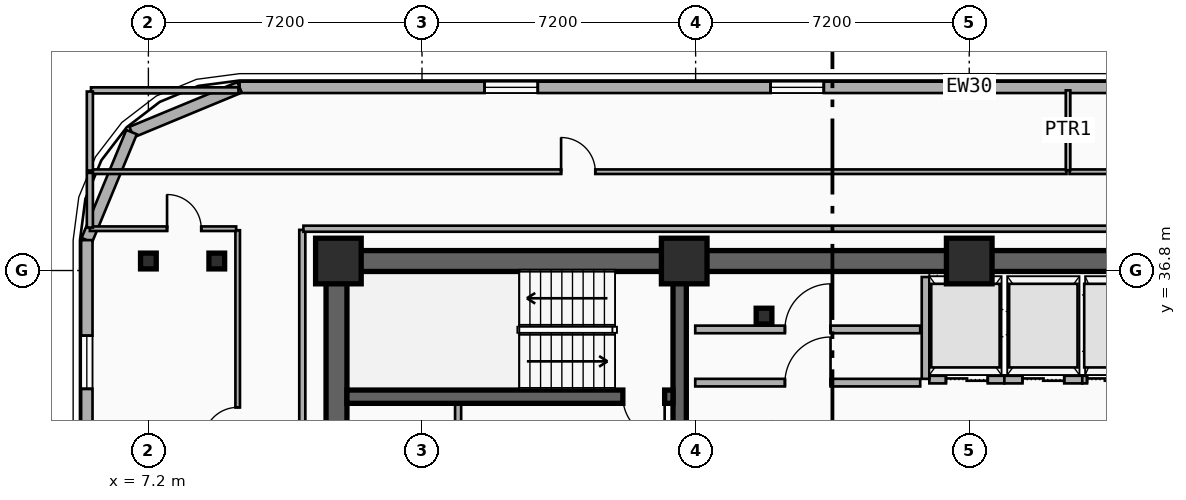
"""IFC4 building model, lengths in metres.
Left out: names, types, materials, properties, quantities, classifications, styles, units other than length and angle.
Written with IfcOpenShell. Run it as: python <this file> out.ifc"""

import sys

from ifc_helpers import new_model, si_unit, direction, frame, frame_2d, origin, origin_2d, place, context, subcontext, project, spatial, rectangle, i_section, extrude, element, fill, save


model = new_model("IFC4")
c1 = context("Model", 3, precision=1e-05, world=origin(), true_north=direction((0.0, 1.0)))
c2 = subcontext(c1, "Body", "Model", "MODEL_VIEW")
j1 = project(units=[si_unit("LENGTHUNIT", "METRE"), si_unit("PLANEANGLEUNIT", "RADIAN")], contexts=[c1])
p1 = place(None, origin())
s1 = spatial("IfcSite", under=j1, at=p1, CompositionType="ELEMENT")
p2 = place(p1, origin())
s2 = spatial("IfcBuilding", under=s1, at=p2, CompositionType="ELEMENT")
p3 = place(p2, frame((0.0, 0.0, 141.25)))
s3 = spatial("IfcBuildingStorey", under=s2, at=p3, CompositionType="ELEMENT", Elevation=141.25)
p4 = place(p3, frame((12.15, 37.05, 0.0), z_axis=(0.0, 0.0, 1.0), x_axis=(1.0, 0.0, 0.0)))
e1 = element("IfcWall", 1, at=p4, inside=s3, PredefinedType="SHEAR", context=c2, shape_type="SweptSolid", body=[
    extrude(rectangle(XDim=33.23, YDim=0.55, at=frame_2d((16.615, 0.0))), origin(), (0.0, 0.0, 1.0), 3.55),
])
p5 = place(p3, frame((12.15, 28.095, 0.0), z_axis=(0.0, 0.0, 1.0), x_axis=(0.0, 1.0, 0.0)))
e2 = element("IfcWall", 2, at=p5, inside=s3, PredefinedType="SHEAR", context=c2, shape_type="SweptSolid", body=[
    extrude(rectangle(XDim=8.68, YDim=0.55, at=frame_2d((4.34, 0.0))), origin(), (0.0, 0.0, 1.0), 3.55),
])
p6 = place(p3, frame((21.18, 28.095, 0.0), z_axis=(0.0, 0.0, 1.0), x_axis=(0.0, 1.0, 0.0)))
e3 = element("IfcWall", 3, at=p6, inside=s3, PredefinedType="SHEAR", context=c2, shape_type="SweptSolid", body=[
    extrude(rectangle(XDim=8.68, YDim=0.35, at=frame_2d((4.34, 0.0))), origin(), (0.0, 0.0, 1.0), 3.55),
])
p7 = place(p3, frame((21.005, 33.48, 0.0), z_axis=(0.0, 0.0, 1.0), x_axis=(-1.0, 0.0, 0.0)))
e4 = element("IfcWall", 4, at=p7, inside=s3, PredefinedType="SHEAR", context=c2, shape_type="SweptSolid", body=[
    extrude(rectangle(XDim=8.58, YDim=0.35, at=frame_2d((4.29, 0.0))), origin(), (0.0, 0.0, 1.0), 3.55),
])
p8 = place(p7, frame((0.22, 0.0, 0.0)))
e5 = element("IfcOpeningElement", 5, at=p8, cuts=e4, PredefinedType="OPENING", context=c2, shape_type="SweptSolid", body=[
    extrude(rectangle(XDim=1.1, YDim=2.15, at=frame_2d((0.55, 1.075))), frame((0.0, 0.185, 0.0), z_axis=(0.0, -1.0, 0.0), x_axis=(1.0, 0.0, 0.0)), (0.0, 0.0, 1.0), 0.37),
])
p9 = place(p3, frame((23.4, 35.6, 0.0), z_axis=(0.0, 0.0, 1.0), x_axis=(1.0, 0.0, 0.0)))
e6 = element("IfcColumn", 6, at=p9, inside=s3, PredefinedType="COLUMN", context=c2, shape_type="SweptSolid", body=[
    extrude(i_section(OverallWidth=0.413, OverallDepth=0.415, WebThickness=0.03, FlangeThickness=0.047, FilletRadius=0.015, at=origin_2d()), origin(), (0.0, 0.0, 1.0), 3.55),
])
for number, where, z_axis, x_axis in (
    (7, (12.2, 37.05, 0.0), (0.0, 0.0, 1.0), (1.0, 0.0, 0.0)),
    (8, (21.3, 37.05, 0.0), (0.0, 0.0, 1.0), (1.0, 0.0, 0.0)),
    (9, (28.8, 37.05, 0.0), (0.0, 0.0, 1.0), (1.0, 0.0, 0.0)),
):
    element("IfcColumn", number, at=place(p3, frame(where, z_axis=z_axis, x_axis=x_axis)), inside=s3, PredefinedType="COLUMN", context=c2, shape_type="SweptSolid", body=[
        extrude(rectangle(XDim=1.2, YDim=1.2, at=origin_2d()), origin(), (0.0, 0.0, 1.0), 3.55),
    ])
for number, where, z_axis, x_axis in (
    (10, (9.0, 37.05, 0.0), (0.0, 0.0, 1.0), (1.0, 0.0, 0.0)),
    (11, (7.2, 37.05, 0.0), (0.0, 0.0, 1.0), (1.0, 0.0, 0.0)),
):
    element("IfcColumn", number, at=place(p3, frame(where, z_axis=z_axis, x_axis=x_axis)), inside=s3, PredefinedType="COLUMN", context=c2, shape_type="SweptSolid", body=[
        extrude(i_section(OverallWidth=0.413, OverallDepth=0.415, WebThickness=0.03, FlangeThickness=0.047, FilletRadius=0.015, at=origin_2d()), origin(), (0.0, 0.0, 1.0), 3.55),
    ])
p10 = place(p3, frame((9.6, 41.62, 0.0), z_axis=(0.0, 0.0, 1.0), x_axis=(1.0, 0.0, 0.0)))
e12 = element("IfcWall", 12, at=p10, inside=s3, PredefinedType="SOLIDWALL", context=c2, shape_type="SweptSolid", body=[
    extrude(rectangle(XDim=38.4, YDim=0.3, at=frame_2d((19.2, 0.0))), origin(), (0.0, 0.0, 1.0), 3.29),
])
p11 = place(p10, frame((6.447, 0.0, 0.75)))
e13 = element("IfcOpeningElement", 13, at=p11, cuts=e12, PredefinedType="OPENING", context=c2, shape_type="SweptSolid", body=[
    extrude(rectangle(XDim=1.4, YDim=2.1, at=frame_2d((0.7, 1.05))), frame((0.0, 0.16, 0.0), z_axis=(0.0, -1.0, 0.0), x_axis=(1.0, 0.0, 0.0)), (0.0, 0.0, 1.0), 0.32),
])
p12 = place(p10, frame((13.973, 0.0, 0.75)))
e14 = element("IfcOpeningElement", 14, at=p12, cuts=e12, PredefinedType="OPENING", context=c2, shape_type="SweptSolid", body=[
    extrude(rectangle(XDim=1.4, YDim=2.1, at=frame_2d((0.7, 1.05))), frame((0.0, 0.16, 0.0), z_axis=(0.0, -1.0, 0.0), x_axis=(1.0, 0.0, 0.0)), (0.0, 0.0, 1.0), 0.32),
])
p13 = place(p10, frame((26.493, 0.0, 0.75)))
e15 = element("IfcOpeningElement", 15, at=p13, cuts=e12, PredefinedType="OPENING", context=c2, shape_type="SweptSolid", body=[
    extrude(rectangle(XDim=1.4, YDim=2.1, at=frame_2d((0.7, 1.05))), frame((0.0, 0.16, 0.0), z_axis=(0.0, -1.0, 0.0), x_axis=(1.0, 0.0, 0.0)), (0.0, 0.0, 1.0), 0.32),
])
p14 = place(p10, frame((32.287, 0.0, 0.75)))
e16 = element("IfcOpeningElement", 16, at=p14, cuts=e12, PredefinedType="OPENING", context=c2, shape_type="SweptSolid", body=[
    extrude(rectangle(XDim=1.4, YDim=2.1, at=frame_2d((0.7, 1.05))), frame((0.0, 0.16, 0.0), z_axis=(0.0, -1.0, 0.0), x_axis=(1.0, 0.0, 0.0)), (0.0, 0.0, 1.0), 0.32),
])
p15 = place(p3, frame((6.757, 40.443, 0.0), z_axis=(0.0, 0.0, 1.0), x_axis=(0.923882414032, 0.382676475685, 0.0)))
e17 = element("IfcWall", 17, at=p15, inside=s3, PredefinedType="SOLIDWALL", context=c2, shape_type="SweptSolid", body=[
    extrude(rectangle(XDim=3.077, YDim=0.3, at=frame_2d((1.539, 0.0))), origin(), (0.0, 0.0, 1.0), 3.29),
])
p16 = place(p3, frame((5.58, 37.6, 0.0), z_axis=(0.0, 0.0, 1.0), x_axis=(0.382636798336, 0.92389884758, 0.0)))
e18 = element("IfcWall", 18, at=p16, inside=s3, PredefinedType="SOLIDWALL", context=c2, shape_type="SweptSolid", body=[
    extrude(rectangle(XDim=3.077, YDim=0.3, at=frame_2d((1.538, 0.0))), origin(), (0.0, 0.0, 1.0), 3.29),
])
p17 = place(p3, frame((5.58, 14.6, 0.0), z_axis=(0.0, 0.0, 1.0), x_axis=(0.0, 1.0, 0.0)))
e19 = element("IfcWall", 19, at=p17, inside=s3, PredefinedType="SOLIDWALL", context=c2, shape_type="SweptSolid", body=[
    extrude(rectangle(XDim=23.0, YDim=0.3, at=frame_2d((11.5, 0.0))), origin(), (0.0, 0.0, 1.0), 3.29),
])
p18 = place(p17, frame((15.493, 0.0, 0.34)))
e20 = element("IfcOpeningElement", 20, at=p18, cuts=e19, PredefinedType="OPENING", context=c2, shape_type="SweptSolid", body=[
    extrude(rectangle(XDim=1.4, YDim=2.1, at=frame_2d((0.7, 1.05))), frame((0.0, 0.16, 0.0), z_axis=(0.0, -1.0, 0.0), x_axis=(1.0, 0.0, 0.0)), (0.0, 0.0, 1.0), 0.32),
])
p19 = place(p17, frame((19.087, 0.0, 0.34)))
e21 = element("IfcOpeningElement", 21, at=p19, cuts=e19, PredefinedType="OPENING", context=c2, shape_type="SweptSolid", body=[
    extrude(rectangle(XDim=1.4, YDim=2.1, at=frame_2d((0.7, 1.05))), frame((0.0, 0.16, 0.0), z_axis=(0.0, -1.0, 0.0), x_axis=(1.0, 0.0, 0.0)), (0.0, 0.0, 1.0), 0.32),
])
p20 = place(p17, frame((2.83, 0.0, 0.34)))
e22 = element("IfcOpeningElement", 22, at=p20, cuts=e19, PredefinedType="OPENING", context=c2, shape_type="SweptSolid", body=[
    extrude(rectangle(XDim=1.4, YDim=2.1, at=frame_2d((0.7, 1.05))), frame((0.0, 0.16, 0.0), z_axis=(0.0, -1.0, 0.0), x_axis=(1.0, 0.0, 0.0)), (0.0, 0.0, 1.0), 0.32),
])
p21 = place(p17, frame((6.74, 0.0, 0.34)))
e23 = element("IfcOpeningElement", 23, at=p21, cuts=e19, PredefinedType="OPENING", context=c2, shape_type="SweptSolid", body=[
    extrude(rectangle(XDim=1.4, YDim=2.1, at=frame_2d((0.7, 1.05))), frame((0.0, 0.16, 0.0), z_axis=(0.0, -1.0, 0.0), x_axis=(1.0, 0.0, 0.0)), (0.0, 0.0, 1.0), 0.32),
])
p22 = place(p3, frame((27.75, 33.93, 0.0), z_axis=(0.0, 0.0, 1.0), x_axis=(1.0, 0.0, 0.0)))
e24 = element("IfcWall", 24, at=p22, inside=s3, PredefinedType="PARTITIONING", context=c2, shape_type="SweptSolid", body=[
    extrude(rectangle(XDim=1.975, YDim=0.2, at=frame_2d((0.988, 0.0))), origin(), (0.0, 0.0, 1.0), 2.36),
])
p23 = place(p22, frame((0.438, 0.0, 0.0)))
e25 = element("IfcOpeningElement", 25, at=p23, cuts=e24, PredefinedType="OPENING", context=c2, shape_type="SweptSolid", body=[
    extrude(rectangle(XDim=1.1, YDim=2.15, at=frame_2d((0.55, 1.075))), frame((0.0, 0.11, 0.0), z_axis=(0.0, -1.0, 0.0), x_axis=(1.0, 0.0, 0.0)), (0.0, 0.0, 1.0), 0.22),
])
p24 = place(p3, frame((27.65, 33.95, 0.0), z_axis=(0.0, 0.0, 1.0), x_axis=(0.0, 1.0, 0.0)))
e26 = element("IfcWall", 26, at=p24, inside=s3, PredefinedType="PARTITIONING", context=c2, shape_type="SweptSolid", body=[
    extrude(rectangle(XDim=2.68, YDim=0.2, at=frame_2d((1.34, 0.0))), origin(), (0.0, 0.0, 1.0), 2.36),
])
p25 = place(p3, frame((29.725, 33.93, 0.0), z_axis=(0.0, 0.0, 1.0), x_axis=(1.0, 0.0, 0.0)))
e27 = element("IfcWall", 27, at=p25, inside=s3, PredefinedType="PARTITIONING", context=c2, shape_type="SweptSolid", body=[
    extrude(rectangle(XDim=2.05, YDim=0.2, at=frame_2d((1.025, 0.0))), origin(), (0.0, 0.0, 1.0), 3.29),
])
p26 = place(p25, frame((0.475, 0.0, 0.0)))
e28 = element("IfcOpeningElement", 28, at=p26, cuts=e27, PredefinedType="OPENING", context=c2, shape_type="SweptSolid", body=[
    extrude(rectangle(XDim=1.1, YDim=2.15, at=frame_2d((0.55, 1.075))), frame((0.0, 0.11, 0.0), z_axis=(0.0, -1.0, 0.0), x_axis=(1.0, 0.0, 0.0)), (0.0, 0.0, 1.0), 0.22),
])
p27 = place(p3, frame((31.775, 33.93, 0.0), z_axis=(0.0, 0.0, 1.0), x_axis=(1.0, 0.0, 0.0)))
e29 = element("IfcWall", 29, at=p27, inside=s3, PredefinedType="PARTITIONING", context=c2, shape_type="SweptSolid", body=[
    extrude(rectangle(XDim=1.2, YDim=0.2, at=frame_2d((0.6, 0.0))), origin(), (0.0, 0.0, 1.0), 3.29),
])
p28 = place(p27, frame((0.125, 0.0, 0.0)))
e30 = element("IfcOpeningElement", 30, at=p28, cuts=e29, PredefinedType="OPENING", context=c2, shape_type="SweptSolid", body=[
    extrude(rectangle(XDim=0.95, YDim=2.15, at=frame_2d((0.475, 1.075))), frame((0.0, 0.11, 0.0), z_axis=(0.0, -1.0, 0.0), x_axis=(1.0, 0.0, 0.0)), (0.0, 0.0, 1.0), 0.22),
])
p29 = place(p3, frame((21.59, 33.85, 0.0), z_axis=(0.0, 0.0, 1.0), x_axis=(1.0, 0.0, 0.0)))
e31 = element("IfcWall", 31, at=p29, inside=s3, PredefinedType="PARTITIONING", context=c2, shape_type="SweptSolid", body=[
    extrude(rectangle(XDim=5.92, YDim=0.2, at=frame_2d((2.96, 0.0))), origin(), (0.0, 0.0, 1.0), 2.36),
])
p30 = place(p29, frame((2.36, 0.0, 0.0)))
e32 = element("IfcOpeningElement", 32, at=p30, cuts=e31, PredefinedType="OPENING", context=c2, shape_type="SweptSolid", body=[
    extrude(rectangle(XDim=1.2, YDim=2.15, at=frame_2d((0.6, 1.075))), frame((0.0, 0.11, 0.0), z_axis=(0.0, -1.0, 0.0), x_axis=(1.0, 0.0, 0.0)), (0.0, 0.0, 1.0), 0.22),
])
p31 = place(p3, frame((21.59, 35.25, 0.0), z_axis=(0.0, 0.0, 1.0), x_axis=(1.0, 0.0, 0.0)))
e33 = element("IfcWall", 33, at=p31, inside=s3, PredefinedType="PARTITIONING", context=c2, shape_type="SweptSolid", body=[
    extrude(rectangle(XDim=5.92, YDim=0.2, at=frame_2d((2.96, 0.0))), origin(), (0.0, 0.0, 1.0), 2.36),
])
p32 = place(p31, frame((2.36, 0.0, 0.0)))
e34 = element("IfcOpeningElement", 34, at=p32, cuts=e33, PredefinedType="OPENING", context=c2, shape_type="SweptSolid", body=[
    extrude(rectangle(XDim=1.2, YDim=2.15, at=frame_2d((0.6, 1.075))), frame((0.0, 0.11, 0.0), z_axis=(0.0, -1.0, 0.0), x_axis=(1.0, 0.0, 0.0)), (0.0, 0.0, 1.0), 0.22),
])
p33 = place(p3, frame((9.55, 27.64, 0.0), z_axis=(0.0, 0.0, 1.0), x_axis=(0.0, 1.0, 0.0)))
e35 = element("IfcWall", 35, at=p33, inside=s3, PredefinedType="PARTITIONING", context=c2, shape_type="SweptSolid", body=[
    extrude(rectangle(XDim=10.22, YDim=0.12, at=frame_2d((5.11, 0.0))), origin(), (0.0, 0.0, 1.0), 2.77),
])
p34 = place(p33, frame((4.66, 0.0, 0.0)))
e36 = element("IfcOpeningElement", 36, at=p34, cuts=e35, PredefinedType="OPENING", context=c2, shape_type="SweptSolid", body=[
    extrude(rectangle(XDim=0.9, YDim=2.1, at=frame_2d((0.45, 1.05))), frame((0.0, 0.07, 0.0), z_axis=(0.0, -1.0, 0.0), x_axis=(1.0, 0.0, 0.0)), (0.0, 0.0, 1.0), 0.14),
])
p35 = place(p3, frame((5.66, 37.9, 0.0), z_axis=(0.0, 0.0, 1.0), x_axis=(1.0, 0.0, 0.0)))
e37 = element("IfcWall", 37, at=p35, inside=s3, PredefinedType="PARTITIONING", context=c2, shape_type="SweptSolid", body=[
    extrude(rectangle(XDim=3.85, YDim=0.12, at=frame_2d((1.925, 0.0))), origin(), (0.0, 0.0, 1.0), 3.29),
])
p36 = place(p35, frame((2.031, 0.0, 0.0)))
e38 = element("IfcOpeningElement", 38, at=p36, cuts=e37, PredefinedType="OPENING", context=c2, shape_type="SweptSolid", body=[
    extrude(rectangle(XDim=0.9, YDim=2.1, at=frame_2d((0.45, 1.05))), frame((0.0, 0.07, 0.0), z_axis=(0.0, -1.0, 0.0), x_axis=(1.0, 0.0, 0.0)), (0.0, 0.0, 1.0), 0.14),
])
p37 = place(p3, frame((5.66, 39.4, 0.0), z_axis=(0.0, 0.0, 1.0), x_axis=(1.0, 0.0, 0.0)))
e39 = element("IfcWall", 39, at=p37, inside=s3, PredefinedType="PARTITIONING", context=c2, shape_type="SweptSolid", body=[
    extrude(rectangle(XDim=25.7, YDim=0.12, at=frame_2d((12.85, 0.0))), origin(), (0.0, 0.0, 1.0), 3.29),
])
p38 = place(p37, frame((12.4, 0.0, 0.0)))
e40 = element("IfcOpeningElement", 40, at=p38, cuts=e39, PredefinedType="OPENING", context=c2, shape_type="SweptSolid", body=[
    extrude(rectangle(XDim=0.9, YDim=2.1, at=frame_2d((0.45, 1.05))), frame((0.0, 0.07, 0.0), z_axis=(0.0, -1.0, 0.0), x_axis=(1.0, 0.0, 0.0)), (0.0, 0.0, 1.0), 0.14),
])
p39 = place(p3, frame((31.44, 39.4, 0.0), z_axis=(0.0, 0.0, 1.0), x_axis=(1.0, 0.0, 0.0)))
e41 = element("IfcWall", 41, at=p39, inside=s3, PredefinedType="PARTITIONING", context=c2, shape_type="SweptSolid", body=[
    extrude(rectangle(XDim=20.5, YDim=0.12, at=frame_2d((10.25, 0.0))), origin(), (0.0, 0.0, 1.0), 3.29),
])
p40 = place(p39, frame((9.8, 0.0, 0.0)))
e42 = element("IfcOpeningElement", 42, at=p40, cuts=e41, PredefinedType="OPENING", context=c2, shape_type="SweptSolid", body=[
    extrude(rectangle(XDim=0.9, YDim=2.1, at=frame_2d((0.45, 1.05))), frame((0.0, 0.07, 0.0), z_axis=(0.0, -1.0, 0.0), x_axis=(1.0, 0.0, 0.0)), (0.0, 0.0, 1.0), 0.14),
])
p41 = place(p3, frame((31.4, 39.44, 0.0), z_axis=(0.0, 0.0, 1.0), x_axis=(0.0, 1.0, 0.0)))
e43 = element("IfcWall", 43, at=p41, inside=s3, PredefinedType="PARTITIONING", context=c2, shape_type="SweptSolid", body=[
    extrude(rectangle(XDim=2.1, YDim=0.12, at=frame_2d((1.05, 0.0))), origin(), (0.0, 0.0, 1.0), 3.29),
])
p42 = place(p3, frame((15.35, 30.96, 0.0), z_axis=(0.0, 0.0, 1.0), x_axis=(0.0, 1.0, 0.0)))
e44 = element("IfcWall", 44, at=p42, inside=s3, PredefinedType="PARTITIONING", context=c2, shape_type="SweptSolid", body=[
    extrude(rectangle(XDim=2.31, YDim=0.16, at=frame_2d((1.155, 0.0))), origin(), (0.0, 0.0, 1.0), 3.29),
])
p43 = place(p3, frame((11.25, 27.63, 0.0), z_axis=(0.0, 0.0, 1.0), x_axis=(0.0, 1.0, 0.0)))
e45 = element("IfcWall", 45, at=p43, inside=s3, PredefinedType="PARTITIONING", context=c2, shape_type="SweptSolid", body=[
    extrude(rectangle(XDim=10.24, YDim=0.16, at=frame_2d((5.12, 0.0))), origin(), (0.0, 0.0, 1.0), 2.77),
])
p44 = place(p3, frame((11.28, 37.9, 0.0), z_axis=(0.0, 0.0, 1.0), x_axis=(1.0, 0.0, 0.0)))
e46 = element("IfcWall", 46, at=p44, inside=s3, PredefinedType="PARTITIONING", context=c2, shape_type="SweptSolid", body=[
    extrude(rectangle(XDim=35.04, YDim=0.16, at=frame_2d((17.52, 0.0))), origin(), (0.0, 0.0, 1.0), 3.29),
])
p45 = place(p3, frame((5.66, 37.93, 0.0), z_axis=(0.0, 0.0, 1.0), x_axis=(0.0, 1.0, 0.0)))
e47 = element("IfcWall", 47, at=p45, inside=s3, PredefinedType="PARTITIONING", context=c2, shape_type="SweptSolid", body=[
    extrude(rectangle(XDim=1.44, YDim=0.16, at=frame_2d((0.72, 0.0))), origin(), (0.0, 0.0, 1.0), 3.29),
])
p46 = place(p3, frame((5.69, 41.54, 0.0), z_axis=(0.0, 0.0, 1.0), x_axis=(1.0, 0.0, 0.0)))
e48 = element("IfcWall", 48, at=p46, inside=s3, PredefinedType="PARTITIONING", context=c2, shape_type="SweptSolid", body=[
    extrude(rectangle(XDim=3.88, YDim=0.16, at=frame_2d((1.94, 0.0))), origin(), (0.0, 0.0, 1.0), 3.29),
])
p47 = place(p3, frame((5.66, 39.43, 0.0), z_axis=(0.0, 0.0, 1.0), x_axis=(0.0, 1.0, 0.0)))
e49 = element("IfcWall", 49, at=p47, inside=s3, PredefinedType="PARTITIONING", context=c2, shape_type="SweptSolid", body=[
    extrude(rectangle(XDim=2.08, YDim=0.16, at=frame_2d((1.04, 0.0))), origin(), (0.0, 0.0, 1.0), 3.29),
])
p48 = place(p11, origin())
e50 = element("IfcWindow", 50, at=p48, inside=s3, PartitioningType="SINGLE_PANEL", PredefinedType="WINDOW", context=c2, shape_type="SweptSolid", body=[
    extrude(rectangle(XDim=1.4, YDim=2.1, at=frame_2d((0.7, 1.05))), frame((0.0, 0.03, 0.0), z_axis=(0.0, -1.0, 0.0), x_axis=(1.0, 0.0, 0.0)), (0.0, 0.0, 1.0), 0.06),
])
fill(e13, e50)
p49 = place(p12, origin())
e51 = element("IfcWindow", 51, at=p49, inside=s3, PartitioningType="SINGLE_PANEL", PredefinedType="WINDOW", context=c2, shape_type="SweptSolid", body=[
    extrude(rectangle(XDim=1.4, YDim=2.1, at=frame_2d((0.7, 1.05))), frame((0.0, 0.03, 0.0), z_axis=(0.0, -1.0, 0.0), x_axis=(1.0, 0.0, 0.0)), (0.0, 0.0, 1.0), 0.06),
])
fill(e14, e51)
p50 = place(p19, origin())
e52 = element("IfcWindow", 52, at=p50, inside=s3, PartitioningType="SINGLE_PANEL", PredefinedType="WINDOW", context=c2, shape_type="SweptSolid", body=[
    extrude(rectangle(XDim=1.4, YDim=2.1, at=frame_2d((0.7, 1.05))), frame((0.0, 0.03, 0.0), z_axis=(0.0, -1.0, 0.0), x_axis=(1.0, 0.0, 0.0)), (0.0, 0.0, 1.0), 0.06),
])
fill(e21, e52)
p51 = place(p23, origin())
e53 = element("IfcDoor", 53, at=p51, inside=s3, OperationType="DOUBLE_DOOR_SLIDING", PredefinedType="DOOR", context=c2, shape_type="SweptSolid", body=[
    extrude(rectangle(XDim=1.1, YDim=2.15, at=frame_2d((0.55, 1.075))), frame((0.0, 0.025, 0.0), z_axis=(0.0, -1.0, 0.0), x_axis=(1.0, 0.0, 0.0)), (0.0, 0.0, 1.0), 0.05),
])
fill(e25, e53)
p52 = place(p26, origin())
e54 = element("IfcDoor", 54, at=p52, inside=s3, OperationType="DOUBLE_DOOR_SLIDING", PredefinedType="DOOR", context=c2, shape_type="SweptSolid", body=[
    extrude(rectangle(XDim=1.1, YDim=2.15, at=frame_2d((0.55, 1.075))), frame((0.0, 0.025, 0.0), z_axis=(0.0, -1.0, 0.0), x_axis=(1.0, 0.0, 0.0)), (0.0, 0.0, 1.0), 0.05),
])
fill(e28, e54)
p53 = place(p28, origin())
e55 = element("IfcDoor", 55, at=p53, inside=s3, OperationType="DOUBLE_DOOR_SLIDING", PredefinedType="DOOR", context=c2, shape_type="SweptSolid", body=[
    extrude(rectangle(XDim=0.95, YDim=2.15, at=frame_2d((0.475, 1.075))), frame((0.0, 0.025, 0.0), z_axis=(0.0, -1.0, 0.0), x_axis=(1.0, 0.0, 0.0)), (0.0, 0.0, 1.0), 0.05),
])
fill(e30, e55)
p54 = place(p8, origin())
e56 = element("IfcDoor", 56, at=p54, inside=s3, OperationType="SINGLE_SWING_LEFT", PredefinedType="DOOR", context=c2, shape_type="SweptSolid", body=[
    extrude(rectangle(XDim=1.1, YDim=2.15, at=frame_2d((0.55, 1.075))), frame((0.0, 0.025, 0.0), z_axis=(0.0, -1.0, 0.0), x_axis=(1.0, 0.0, 0.0)), (0.0, 0.0, 1.0), 0.05),
])
fill(e5, e56)
p55 = place(p30, origin())
e57 = element("IfcDoor", 57, at=p55, inside=s3, OperationType="SINGLE_SWING_RIGHT", PredefinedType="DOOR", context=c2, shape_type="SweptSolid", body=[
    extrude(rectangle(XDim=1.2, YDim=2.15, at=frame_2d((0.6, 1.075))), frame((0.0, 0.025, 0.0), z_axis=(0.0, -1.0, 0.0), x_axis=(1.0, 0.0, 0.0)), (0.0, 0.0, 1.0), 0.05),
])
fill(e32, e57)
p56 = place(p32, origin())
e58 = element("IfcDoor", 58, at=p56, inside=s3, OperationType="SINGLE_SWING_RIGHT", PredefinedType="DOOR", context=c2, shape_type="SweptSolid", body=[
    extrude(rectangle(XDim=1.2, YDim=2.15, at=frame_2d((0.6, 1.075))), frame((0.0, 0.025, 0.0), z_axis=(0.0, -1.0, 0.0), x_axis=(1.0, 0.0, 0.0)), (0.0, 0.0, 1.0), 0.05),
])
fill(e34, e58)
p57 = place(p34, origin())
e59 = element("IfcDoor", 59, at=p57, inside=s3, OperationType="SINGLE_SWING_LEFT", PredefinedType="DOOR", context=c2, shape_type="SweptSolid", body=[
    extrude(rectangle(XDim=0.9, YDim=2.1, at=frame_2d((0.45, 1.05))), frame((0.0, 0.025, 0.0), z_axis=(0.0, -1.0, 0.0), x_axis=(1.0, 0.0, 0.0)), (0.0, 0.0, 1.0), 0.05),
])
fill(e36, e59)
p58 = place(p36, origin())
e60 = element("IfcDoor", 60, at=p58, inside=s3, OperationType="SINGLE_SWING_LEFT", PredefinedType="DOOR", context=c2, shape_type="SweptSolid", body=[
    extrude(rectangle(XDim=0.9, YDim=2.1, at=frame_2d((0.45, 1.05))), frame((0.0, 0.025, 0.0), z_axis=(0.0, -1.0, 0.0), x_axis=(1.0, 0.0, 0.0)), (0.0, 0.0, 1.0), 0.05),
])
fill(e38, e60)
p59 = place(p38, origin())
e61 = element("IfcDoor", 61, at=p59, inside=s3, OperationType="SINGLE_SWING_LEFT", PredefinedType="DOOR", context=c2, shape_type="SweptSolid", body=[
    extrude(rectangle(XDim=0.9, YDim=2.1, at=frame_2d((0.45, 1.05))), frame((0.0, 0.025, 0.0), z_axis=(0.0, -1.0, 0.0), x_axis=(1.0, 0.0, 0.0)), (0.0, 0.0, 1.0), 0.05),
])
fill(e40, e61)
save(model, sys.argv[1])
